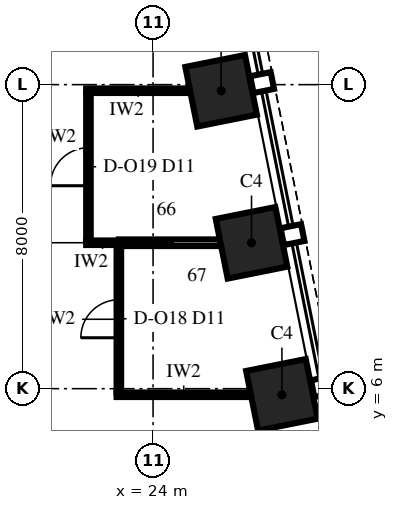
"""IFC4 building model, lengths in metres.
Left out: names, types, materials, properties, quantities, classifications, styles, units other than length and angle.
Written with IfcOpenShell. Run it as: python <this file> out.ifc"""

import sys

from ifc_helpers import new_model, si_unit, direction, frame, frame_2d, origin, origin_2d, place, context, subcontext, project, spatial, rectangle, extrude, element, fill, save


model = new_model("IFC4")
c1 = context("Model", 3, precision=1e-05, world=origin(), true_north=direction((0.0, 1.0)))
c2 = subcontext(c1, "Body", "Model", "MODEL_VIEW")
j1 = project(units=[si_unit("LENGTHUNIT", "METRE"), si_unit("PLANEANGLEUNIT", "RADIAN")], contexts=[c1])
p1 = place(None, origin())
s1 = spatial("IfcSite", under=j1, at=p1, CompositionType="ELEMENT")
p2 = place(p1, origin())
s2 = spatial("IfcBuilding", under=s1, at=p2, CompositionType="ELEMENT")
p3 = place(p2, frame((0.0, 0.0, 214.0)))
s3 = spatial("IfcBuildingStorey", under=s2, at=p3, CompositionType="ELEMENT", Elevation=214.0)
for number, where, z_axis, x_axis in (
    (1, (27.391, 5.838, 0.0), (0.0, 0.0, 1.0), (-0.196, 0.981, 0.0)),
    (2, (26.591, 9.838, 0.0), (0.0, 0.0, 1.0), (-0.196, 0.981, 0.0)),
    (3, (25.791, 13.838, 0.0), (0.0, 0.0, 1.0), (-0.196, 0.981, 0.0)),
):
    element("IfcColumn", number, at=place(p3, frame(where, z_axis=z_axis, x_axis=x_axis)), inside=s3, PredefinedType="COLUMN", context=c2, shape_type="SweptSolid", body=[
        extrude(rectangle(XDim=1.6, YDim=1.6, at=origin_2d()), origin(), (0.0, 0.0, 1.0), 4.0),
    ])
p4 = place(p3, frame((23.04, 5.84, 0.0), z_axis=(0.0, 0.0, 1.0), x_axis=(1.0, 0.0, 0.0)))
e4 = element("IfcWall", 4, at=p4, inside=s3, PredefinedType="PARTITIONING", context=c2, shape_type="SweptSolid", body=[
    extrude(rectangle(XDim=3.535, YDim=0.12, at=frame_2d((1.767, 0.0))), origin(), (0.0, 0.0, 1.0), 2.842),
])
p5 = place(p3, frame((22.24, 9.84, 0.0), z_axis=(0.0, 0.0, 1.0), x_axis=(1.0, 0.0, 0.0)))
e5 = element("IfcWall", 5, at=p5, inside=s3, PredefinedType="PARTITIONING", context=c2, shape_type="SweptSolid", body=[
    extrude(rectangle(XDim=0.86, YDim=0.12, at=frame_2d((0.43, 0.0))), origin(), (0.0, 0.0, 1.0), 3.25),
])
p6 = place(p3, frame((23.1, 9.84, 0.0), z_axis=(0.0, 0.0, 1.0), x_axis=(1.0, 0.0, 0.0)))
e6 = element("IfcWall", 6, at=p6, inside=s3, PredefinedType="PARTITIONING", context=c2, shape_type="SweptSolid", body=[
    extrude(rectangle(XDim=2.675, YDim=0.175, at=frame_2d((1.337, 0.0))), origin(), (0.0, 0.0, 1.0), 3.25),
])
p7 = place(p3, frame((22.24, 13.84, 0.0), z_axis=(0.0, 0.0, 1.0), x_axis=(1.0, 0.0, 0.0)))
e7 = element("IfcWall", 7, at=p7, inside=s3, PredefinedType="PARTITIONING", context=c2, shape_type="SweptSolid", body=[
    extrude(rectangle(XDim=2.735, YDim=0.12, at=frame_2d((1.367, 0.0))), origin(), (0.0, 0.0, 1.0), 3.25),
])
p8 = place(p3, frame((22.3, 9.9, 0.0), z_axis=(0.0, 0.0, 1.0), x_axis=(0.0, 1.0, 0.0)))
e8 = element("IfcWall", 8, at=p8, inside=s3, PredefinedType="PARTITIONING", context=c2, shape_type="SweptSolid", body=[
    extrude(rectangle(XDim=3.88, YDim=0.12, at=frame_2d((1.94, 0.0))), origin(), (0.0, 0.0, 1.0), 3.85),
])
p9 = place(p8, frame((1.44, 0.0, 0.0)))
e9 = element("IfcOpeningElement", 9, at=p9, cuts=e8, PredefinedType="OPENING", context=c2, shape_type="SweptSolid", body=[
    extrude(rectangle(XDim=1.0, YDim=2.4, at=frame_2d((0.5, 1.2))), frame((0.0, 0.075, 0.0), z_axis=(0.0, -1.0, 0.0), x_axis=(1.0, 0.0, 0.0)), (0.0, 0.0, 1.0), 0.15),
])
p10 = place(p3, frame((23.1, 5.9, 0.0), z_axis=(0.0, 0.0, 1.0), x_axis=(0.0, 1.0, 0.0)))
e10 = element("IfcWall", 10, at=p10, inside=s3, PredefinedType="PARTITIONING", context=c2, shape_type="SweptSolid", body=[
    extrude(rectangle(XDim=3.853, YDim=0.12, at=frame_2d((1.926, 0.0))), origin(), (0.0, 0.0, 1.0), 2.842),
])
p11 = place(p10, frame((1.44, 0.0, 0.0)))
e11 = element("IfcOpeningElement", 11, at=p11, cuts=e10, PredefinedType="OPENING", context=c2, shape_type="SweptSolid", body=[
    extrude(rectangle(XDim=1.0, YDim=2.4, at=frame_2d((0.5, 1.2))), frame((0.0, 0.075, 0.0), z_axis=(0.0, -1.0, 0.0), x_axis=(1.0, 0.0, 0.0)), (0.0, 0.0, 1.0), 0.15),
])
p12 = place(p11, origin())
e12 = element("IfcDoor", 12, at=p12, inside=s3, OperationType="SINGLE_SWING_RIGHT", PredefinedType="DOOR", context=c2, shape_type="SweptSolid", body=[
    extrude(rectangle(XDim=1.0, YDim=2.4, at=frame_2d((0.5, 1.2))), frame((0.0, 0.06, 0.0), z_axis=(0.0, -1.0, 0.0), x_axis=(1.0, 0.0, 0.0)), (0.0, 0.0, 1.0), 0.12),
])
fill(e11, e12)
p13 = place(p9, origin())
e13 = element("IfcDoor", 13, at=p13, inside=s3, OperationType="SINGLE_SWING_RIGHT", PredefinedType="DOOR", context=c2, shape_type="SweptSolid", body=[
    extrude(rectangle(XDim=1.0, YDim=2.4, at=frame_2d((0.5, 1.2))), frame((0.0, 0.06, 0.0), z_axis=(0.0, -1.0, 0.0), x_axis=(1.0, 0.0, 0.0)), (0.0, 0.0, 1.0), 0.12),
])
fill(e9, e13)
save(model, sys.argv[1])
